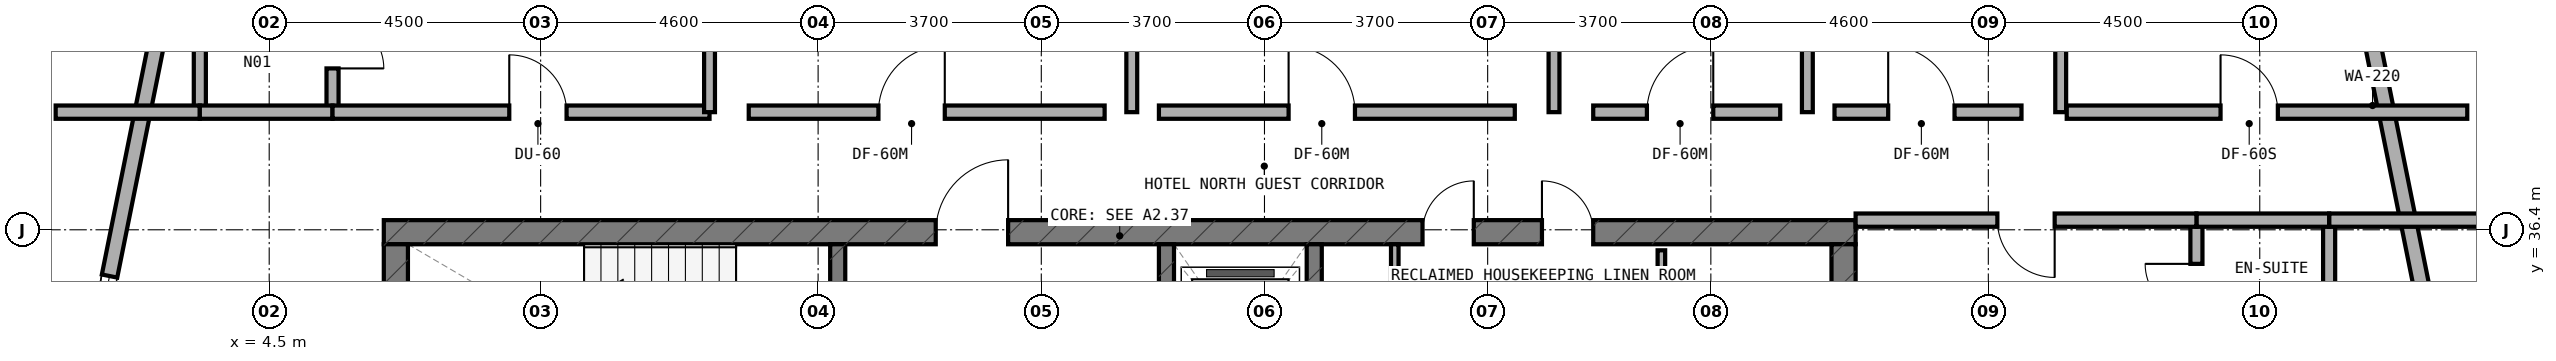
"""IFC4 building model, lengths in metres.
Left out: names, types, materials, properties, quantities, classifications, styles, units other than length and angle.
Written with IfcOpenShell. Run it as: python <this file> out.ifc"""

import sys

from ifc_helpers import new_model, si_unit, direction, frame, frame_2d, origin, place, context, subcontext, project, spatial, rectangle, extrude, element, fill, save


model = new_model("IFC4")
c1 = context("Model", 3, precision=1e-05, world=origin(), true_north=direction((0.0, 1.0)))
c2 = subcontext(c1, "Body", "Model", "MODEL_VIEW")
j1 = project(units=[si_unit("LENGTHUNIT", "METRE"), si_unit("PLANEANGLEUNIT", "RADIAN")], contexts=[c1])
p1 = place(None, origin())
s1 = spatial("IfcSite", under=j1, at=p1, CompositionType="ELEMENT")
p2 = place(p1, origin())
s2 = spatial("IfcBuilding", under=s1, at=p2, CompositionType="ELEMENT")
p3 = place(p2, frame((0.0, 0.0, 166.0)))
s3 = spatial("IfcBuildingStorey", under=s2, at=p3, CompositionType="ELEMENT", Elevation=166.0)
p4 = place(p3, frame((6.4, 36.36, 0.0), z_axis=(0.0, 0.0, 1.0), x_axis=(1.0, 0.0, 0.0)))
e1 = element("IfcWall", 1, at=p4, inside=s3, PredefinedType="SHEAR", context=c2, shape_type="SweptSolid", body=[
    extrude(rectangle(XDim=24.4, YDim=0.4, at=frame_2d((12.2, 0.0))), origin(), (0.0, 0.0, 1.0), 3.5),
])
p5 = place(p4, frame((9.15, 0.0, 0.0)))
e2 = element("IfcOpeningElement", 2, at=p5, cuts=e1, PredefinedType="OPENING", context=c2, shape_type="SweptSolid", body=[
    extrude(rectangle(XDim=1.2, YDim=2.15, at=frame_2d((0.6, 1.075))), frame((0.0, 0.21, 0.0), z_axis=(0.0, -1.0, 0.0), x_axis=(1.0, 0.0, 0.0)), (0.0, 0.0, 1.0), 0.42),
])
p6 = place(p4, frame((19.2, 0.0, 0.0)))
e3 = element("IfcOpeningElement", 3, at=p6, cuts=e1, PredefinedType="OPENING", context=c2, shape_type="SweptSolid", body=[
    extrude(rectangle(XDim=0.85, YDim=2.1, at=frame_2d((0.425, 1.05))), frame((0.0, 0.21, 0.0), z_axis=(0.0, -1.0, 0.0), x_axis=(1.0, 0.0, 0.0)), (0.0, 0.0, 1.0), 0.42),
])
p7 = place(p4, frame((17.22, 0.0, 0.0)))
e4 = element("IfcOpeningElement", 4, at=p7, cuts=e1, PredefinedType="OPENING", context=c2, shape_type="SweptSolid", body=[
    extrude(rectangle(XDim=0.85, YDim=2.1, at=frame_2d((0.425, 1.05))), frame((0.0, 0.21, 0.0), z_axis=(0.0, -1.0, 0.0), x_axis=(1.0, 0.0, 0.0)), (0.0, 0.0, 1.0), 0.42),
])
for number, where, z_axis, x_axis in (
    (5, (6.6, 33.0, 0.0), (0.0, 0.0, 1.0), (0.0, 1.0, 0.0)),
    (6, (30.6, 33.0, 0.0), (0.0, 0.0, 1.0), (0.0, 1.0, 0.0)),
):
    element("IfcWall", number, at=place(p3, frame(where, z_axis=z_axis, x_axis=x_axis)), inside=s3, PredefinedType="SHEAR", context=c2, shape_type="SweptSolid", body=[
        extrude(rectangle(XDim=3.16, YDim=0.4, at=frame_2d((1.58, 0.0))), origin(), (0.0, 0.0, 1.0), 3.5),
    ])
p8 = place(p3, frame((13.925, 33.0, 0.0), z_axis=(0.0, 0.0, 1.0), x_axis=(0.0, 1.0, 0.0)))
e7 = element("IfcWall", 7, at=p8, inside=s3, PredefinedType="STANDARD", context=c2, shape_type="SweptSolid", body=[
    extrude(rectangle(XDim=3.16, YDim=0.25, at=frame_2d((1.58, 0.0))), origin(), (0.0, 0.0, 1.0), 3.22),
])
p9 = place(p8, frame((0.98, 0.0, 0.0)))
e8 = element("IfcOpeningElement", 8, at=p9, cuts=e7, PredefinedType="OPENING", context=c2, shape_type="SweptSolid", body=[
    extrude(rectangle(XDim=1.1, YDim=2.15, at=frame_2d((0.55, 1.075))), frame((0.0, 0.135, 0.0), z_axis=(0.0, -1.0, 0.0), x_axis=(1.0, 0.0, 0.0)), (0.0, 0.0, 1.0), 0.27),
])
p10 = place(p3, frame((19.375, 33.0, 0.0), z_axis=(0.0, 0.0, 1.0), x_axis=(0.0, 1.0, 0.0)))
e9 = element("IfcWall", 9, at=p10, inside=s3, PredefinedType="STANDARD", context=c2, shape_type="SweptSolid", body=[
    extrude(rectangle(XDim=3.16, YDim=0.25, at=frame_2d((1.58, 0.0))), origin(), (0.0, 0.0, 1.0), 3.22),
])
p11 = place(p10, frame((0.98, 0.0, 0.0)))
e10 = element("IfcOpeningElement", 10, at=p11, cuts=e9, PredefinedType="OPENING", context=c2, shape_type="SweptSolid", body=[
    extrude(rectangle(XDim=1.1, YDim=2.15, at=frame_2d((0.55, 1.075))), frame((0.0, 0.135, 0.0), z_axis=(0.0, -1.0, 0.0), x_axis=(1.0, 0.0, 0.0)), (0.0, 0.0, 1.0), 0.27),
])
p12 = place(p3, frame((21.825, 33.0, 0.0), z_axis=(0.0, 0.0, 1.0), x_axis=(0.0, 1.0, 0.0)))
e11 = element("IfcWall", 11, at=p12, inside=s3, PredefinedType="STANDARD", context=c2, shape_type="SweptSolid", body=[
    extrude(rectangle(XDim=3.16, YDim=0.25, at=frame_2d((1.58, 0.0))), origin(), (0.0, 0.0, 1.0), 3.22),
])
p13 = place(p3, frame((41.084, 30.98, 0.0), z_axis=(0.0, 0.0, 1.0), x_axis=(-0.197435082048, 0.980315963543, 0.0)))
e12 = element("IfcWall", 12, at=p13, inside=s3, PredefinedType="STANDARD", context=c2, shape_type="SweptSolid", body=[
    extrude(rectangle(XDim=9.183, YDim=0.26, at=frame_2d((4.591, 0.0))), origin(), (0.0, 0.0, 1.0), 3.22),
])
p14 = place(p13, frame((1.734, 0.0, 0.85)))
e13 = element("IfcOpeningElement", 13, at=p14, cuts=e12, PredefinedType="OPENING", context=c2, shape_type="SweptSolid", body=[
    extrude(rectangle(XDim=2.1, YDim=1.5, at=frame_2d((1.05, 0.75))), frame((0.0, 0.14, 0.0), z_axis=(0.0, -1.0, 0.0), x_axis=(1.0, 0.0, 0.0)), (0.0, 0.0, 1.0), 0.28),
])
p15 = place(p3, frame((2.729, 39.982, 0.0), z_axis=(0.0, 0.0, 1.0), x_axis=(-0.197435082048, -0.980315963543, 0.0)))
e14 = element("IfcWall", 14, at=p15, inside=s3, PredefinedType="STANDARD", context=c2, shape_type="SweptSolid", body=[
    extrude(rectangle(XDim=9.183, YDim=0.26, at=frame_2d((4.591, 0.0))), origin(), (0.0, 0.0, 1.0), 3.22),
])
p16 = place(p15, frame((4.436, 0.0, 0.85)))
e15 = element("IfcOpeningElement", 15, at=p16, cuts=e14, PredefinedType="OPENING", context=c2, shape_type="SweptSolid", body=[
    extrude(rectangle(XDim=2.1, YDim=1.5, at=frame_2d((1.05, 0.75))), frame((0.0, 0.14, 0.0), z_axis=(0.0, -1.0, 0.0), x_axis=(1.0, 0.0, 0.0)), (0.0, 0.0, 1.0), 0.28),
])
p17 = place(p3, frame((27.58, 33.1, 0.0), z_axis=(0.0, 0.0, 1.0), x_axis=(0.0, 1.0, 0.0)))
e16 = element("IfcWall", 16, at=p17, inside=s3, PredefinedType="PARTITIONING", context=c2, shape_type="SweptSolid", body=[
    extrude(rectangle(XDim=2.96, YDim=0.125, at=frame_2d((1.48, 0.0))), origin(), (0.0, 0.0, 1.0), 2.795),
])
p18 = place(p17, frame((1.055, 0.0, 0.0)))
e17 = element("IfcOpeningElement", 17, at=p18, cuts=e16, PredefinedType="OPENING", context=c2, shape_type="SweptSolid", body=[
    extrude(rectangle(XDim=0.85, YDim=2.1, at=frame_2d((0.425, 1.05))), frame((0.0, 0.073, 0.0), z_axis=(0.0, -1.0, 0.0), x_axis=(1.0, 0.0, 0.0)), (0.0, 0.0, 1.0), 0.145),
])
p19 = place(p3, frame((23.16, 34.82, 0.0), z_axis=(0.0, 0.0, 1.0), x_axis=(0.0, 1.0, 0.0)))
e18 = element("IfcWall", 18, at=p19, inside=s3, PredefinedType="PARTITIONING", context=c2, shape_type="SweptSolid", body=[
    extrude(rectangle(XDim=1.34, YDim=0.125, at=frame_2d((0.67, 0.0))), origin(), (0.0, 0.0, 1.0), 3.22),
])
p20 = place(p3, frame((5.55, 38.45, 0.0), z_axis=(0.0, 0.0, 1.0), x_axis=(0.0, 1.0, 0.0)))
e19 = element("IfcWall", 19, at=p20, inside=s3, PredefinedType="PLUMBINGWALL", context=c2, shape_type="SweptSolid", body=[
    extrude(rectangle(XDim=2.1, YDim=0.2, at=frame_2d((1.05, 0.0))), origin(), (0.0, 0.0, 1.0), 3.22),
])
p21 = place(p20, frame((0.625, 0.0, 0.0)))
e20 = element("IfcOpeningElement", 20, at=p21, cuts=e19, PredefinedType="OPENING", context=c2, shape_type="SweptSolid", body=[
    extrude(rectangle(XDim=0.85, YDim=2.1, at=frame_2d((0.425, 1.05))), frame((0.0, 0.11, 0.0), z_axis=(0.0, -1.0, 0.0), x_axis=(1.0, 0.0, 0.0)), (0.0, 0.0, 1.0), 0.22),
])
p22 = place(p3, frame((3.35, 38.45, 0.0), z_axis=(0.0, 0.0, 1.0), x_axis=(0.0, 1.0, 0.0)))
e21 = element("IfcWall", 21, at=p22, inside=s3, PredefinedType="PLUMBINGWALL", context=c2, shape_type="SweptSolid", body=[
    extrude(rectangle(XDim=2.1, YDim=0.2, at=frame_2d((1.05, 0.0))), origin(), (0.0, 0.0, 1.0), 3.22),
])
p23 = place(p3, frame((0.96, 38.35, 0.0), z_axis=(0.0, 0.0, 1.0), x_axis=(1.0, 0.0, 0.0)))
e22 = element("IfcWall", 22, at=p23, inside=s3, PredefinedType="SOLIDWALL", context=c2, shape_type="SweptSolid", body=[
    extrude(rectangle(XDim=2.39, YDim=0.22, at=frame_2d((1.195, 0.0))), origin(), (0.0, 0.0, 1.0), 3.22),
])
p24 = place(p3, frame((3.35, 38.35, 0.0), z_axis=(0.0, 0.0, 1.0), x_axis=(1.0, 0.0, 0.0)))
e23 = element("IfcWall", 23, at=p24, inside=s3, PredefinedType="SOLIDWALL", context=c2, shape_type="SweptSolid", body=[
    extrude(rectangle(XDim=2.2, YDim=0.22, at=frame_2d((1.1, 0.0))), origin(), (0.0, 0.0, 1.0), 3.22),
])
p25 = place(p3, frame((5.55, 38.35, 0.0), z_axis=(0.0, 0.0, 1.0), x_axis=(1.0, 0.0, 0.0)))
e24 = element("IfcWall", 24, at=p25, inside=s3, PredefinedType="SOLIDWALL", context=c2, shape_type="SweptSolid", body=[
    extrude(rectangle(XDim=6.25, YDim=0.22, at=frame_2d((3.125, 0.0))), origin(), (0.0, 0.0, 1.0), 2.795),
])
p26 = place(p25, frame((2.93, 0.0, 0.0)))
e25 = element("IfcOpeningElement", 25, at=p26, cuts=e24, PredefinedType="OPENING", context=c2, shape_type="SweptSolid", body=[
    extrude(rectangle(XDim=0.95, YDim=2.1, at=frame_2d((0.475, 1.05))), frame((0.0, 0.12, 0.0), z_axis=(0.0, -1.0, 0.0), x_axis=(1.0, 0.0, 0.0)), (0.0, 0.0, 1.0), 0.24),
])
p27 = place(p3, frame((11.8, 38.35, 0.0), z_axis=(0.0, 0.0, 1.0), x_axis=(0.0, 1.0, 0.0)))
e26 = element("IfcWall", 26, at=p27, inside=s3, PredefinedType="SOLIDWALL", context=c2, shape_type="SweptSolid", body=[
    extrude(rectangle(XDim=6.157, YDim=0.18, at=frame_2d((3.079, 0.0))), origin(), (0.0, 0.0, 1.0), 2.835),
])
p28 = place(p3, frame((18.8, 38.35, 0.0), z_axis=(0.0, 0.0, 1.0), x_axis=(0.0, 1.0, 0.0)))
e27 = element("IfcWall", 27, at=p28, inside=s3, PredefinedType="SOLIDWALL", context=c2, shape_type="SweptSolid", body=[
    extrude(rectangle(XDim=6.79, YDim=0.18, at=frame_2d((3.395, 0.0))), origin(), (0.0, 0.0, 1.0), 2.835),
])
p29 = place(p3, frame((12.45, 38.35, 0.0), z_axis=(0.0, 0.0, 1.0), x_axis=(1.0, 0.0, 0.0)))
e28 = element("IfcWall", 28, at=p29, inside=s3, PredefinedType="SOLIDWALL", context=c2, shape_type="SweptSolid", body=[
    extrude(rectangle(XDim=5.9, YDim=0.22, at=frame_2d((2.95, 0.0))), origin(), (0.0, 0.0, 1.0), 2.795),
])
p30 = place(p29, frame((2.15, 0.0, 0.0)))
e29 = element("IfcOpeningElement", 29, at=p30, cuts=e28, PredefinedType="OPENING", context=c2, shape_type="SweptSolid", body=[
    extrude(rectangle(XDim=1.1, YDim=2.1, at=frame_2d((0.55, 1.05))), frame((0.0, 0.12, 0.0), z_axis=(0.0, -1.0, 0.0), x_axis=(1.0, 0.0, 0.0)), (0.0, 0.0, 1.0), 0.24),
])
p31 = place(p3, frame((19.25, 38.35, 0.0), z_axis=(0.0, 0.0, 1.0), x_axis=(1.0, 0.0, 0.0)))
e30 = element("IfcWall", 30, at=p31, inside=s3, PredefinedType="SOLIDWALL", context=c2, shape_type="SweptSolid", body=[
    extrude(rectangle(XDim=5.9, YDim=0.22, at=frame_2d((2.95, 0.0))), origin(), (0.0, 0.0, 1.0), 3.22),
])
p32 = place(p31, frame((2.15, 0.0, 0.0)))
e31 = element("IfcOpeningElement", 31, at=p32, cuts=e30, PredefinedType="OPENING", context=c2, shape_type="SweptSolid", body=[
    extrude(rectangle(XDim=1.1, YDim=2.1, at=frame_2d((0.55, 1.05))), frame((0.0, 0.12, 0.0), z_axis=(0.0, -1.0, 0.0), x_axis=(1.0, 0.0, 0.0)), (0.0, 0.0, 1.0), 0.24),
])
p33 = place(p3, frame((25.8, 38.35, 0.0), z_axis=(0.0, 0.0, 1.0), x_axis=(0.0, 1.0, 0.0)))
e32 = element("IfcWall", 32, at=p33, inside=s3, PredefinedType="SOLIDWALL", context=c2, shape_type="SweptSolid", body=[
    extrude(rectangle(XDim=6.79, YDim=0.18, at=frame_2d((3.395, 0.0))), origin(), (0.0, 0.0, 1.0), 2.795),
])
p34 = place(p3, frame((30.0, 38.35, 0.0), z_axis=(0.0, 0.0, 1.0), x_axis=(0.0, 1.0, 0.0)))
e33 = element("IfcWall", 33, at=p34, inside=s3, PredefinedType="SOLIDWALL", context=c2, shape_type="SweptSolid", body=[
    extrude(rectangle(XDim=6.197, YDim=0.18, at=frame_2d((3.099, 0.0))), origin(), (0.0, 0.0, 1.0), 2.835),
])
p35 = place(p3, frame((26.45, 38.35, 0.0), z_axis=(0.0, 0.0, 1.0), x_axis=(1.0, 0.0, 0.0)))
e34 = element("IfcWall", 34, at=p35, inside=s3, PredefinedType="SOLIDWALL", context=c2, shape_type="SweptSolid", body=[
    extrude(rectangle(XDim=3.1, YDim=0.22, at=frame_2d((1.55, 0.0))), origin(), (0.0, 0.0, 1.0), 2.795),
])
p36 = place(p35, frame((0.89, 0.0, 0.0)))
e35 = element("IfcOpeningElement", 35, at=p36, cuts=e34, PredefinedType="OPENING", context=c2, shape_type="SweptSolid", body=[
    extrude(rectangle(XDim=1.1, YDim=2.1, at=frame_2d((0.55, 1.05))), frame((0.0, 0.12, 0.0), z_axis=(0.0, -1.0, 0.0), x_axis=(1.0, 0.0, 0.0)), (0.0, 0.0, 1.0), 0.24),
])
p37 = place(p3, frame((30.45, 38.35, 0.0), z_axis=(0.0, 0.0, 1.0), x_axis=(1.0, 0.0, 0.0)))
e36 = element("IfcWall", 36, at=p37, inside=s3, PredefinedType="SOLIDWALL", context=c2, shape_type="SweptSolid", body=[
    extrude(rectangle(XDim=3.1, YDim=0.22, at=frame_2d((1.55, 0.0))), origin(), (0.0, 0.0, 1.0), 3.22),
])
p38 = place(p37, frame((0.89, 0.0, 0.0)))
e37 = element("IfcOpeningElement", 37, at=p38, cuts=e36, PredefinedType="OPENING", context=c2, shape_type="SweptSolid", body=[
    extrude(rectangle(XDim=1.1, YDim=2.1, at=frame_2d((0.55, 1.05))), frame((0.0, 0.12, 0.0), z_axis=(0.0, -1.0, 0.0), x_axis=(1.0, 0.0, 0.0)), (0.0, 0.0, 1.0), 0.24),
])
p39 = place(p3, frame((34.2, 38.35, 0.0), z_axis=(0.0, 0.0, 1.0), x_axis=(0.0, 1.0, 0.0)))
e38 = element("IfcWall", 38, at=p39, inside=s3, PredefinedType="SOLIDWALL", context=c2, shape_type="SweptSolid", body=[
    extrude(rectangle(XDim=5.351, YDim=0.18, at=frame_2d((2.675, 0.0))), origin(), (0.0, 0.0, 1.0), 2.795),
])
p40 = place(p3, frame((34.3, 38.35, 0.0), z_axis=(0.0, 0.0, 1.0), x_axis=(1.0, 0.0, 0.0)))
e39 = element("IfcWall", 39, at=p40, inside=s3, PredefinedType="SOLIDWALL", context=c2, shape_type="SweptSolid", body=[
    extrude(rectangle(XDim=6.64, YDim=0.22, at=frame_2d((3.32, 0.0))), origin(), (0.0, 0.0, 1.0), 2.835),
])
p41 = place(p40, frame((2.55, 0.0, 0.0)))
e40 = element("IfcOpeningElement", 40, at=p41, cuts=e39, PredefinedType="OPENING", context=c2, shape_type="SweptSolid", body=[
    extrude(rectangle(XDim=0.95, YDim=2.1, at=frame_2d((0.475, 1.05))), frame((0.0, 0.12, 0.0), z_axis=(0.0, -1.0, 0.0), x_axis=(1.0, 0.0, 0.0)), (0.0, 0.0, 1.0), 0.24),
])
p42 = place(p3, frame((36.45, 34.36, 0.0), z_axis=(0.0, 0.0, 1.0), x_axis=(0.0, 1.0, 0.0)))
e41 = element("IfcWall", 41, at=p42, inside=s3, PredefinedType="PLUMBINGWALL", context=c2, shape_type="SweptSolid", body=[
    extrude(rectangle(XDim=2.1, YDim=0.2, at=frame_2d((1.05, 0.0))), origin(), (0.0, 0.0, 1.0), 3.22),
])
p43 = place(p42, frame((0.625, 0.0, 0.0)))
e42 = element("IfcOpeningElement", 42, at=p43, cuts=e41, PredefinedType="OPENING", context=c2, shape_type="SweptSolid", body=[
    extrude(rectangle(XDim=0.85, YDim=2.1, at=frame_2d((0.425, 1.05))), frame((0.0, 0.11, 0.0), z_axis=(0.0, -1.0, 0.0), x_axis=(1.0, 0.0, 0.0)), (0.0, 0.0, 1.0), 0.22),
])
p44 = place(p3, frame((38.65, 34.36, 0.0), z_axis=(0.0, 0.0, 1.0), x_axis=(0.0, 1.0, 0.0)))
e43 = element("IfcWall", 43, at=p44, inside=s3, PredefinedType="PLUMBINGWALL", context=c2, shape_type="SweptSolid", body=[
    extrude(rectangle(XDim=2.1, YDim=0.2, at=frame_2d((1.05, 0.0))), origin(), (0.0, 0.0, 1.0), 3.22),
])
p45 = place(p3, frame((38.65, 36.56, 0.0), z_axis=(0.0, 0.0, 1.0), x_axis=(1.0, 0.0, 0.0)))
e44 = element("IfcWall", 44, at=p45, inside=s3, PredefinedType="SOLIDWALL", context=c2, shape_type="SweptSolid", body=[
    extrude(rectangle(XDim=2.55, YDim=0.22, at=frame_2d((1.275, 0.0))), origin(), (0.0, 0.0, 1.0), 3.22),
])
p46 = place(p3, frame((36.45, 36.56, 0.0), z_axis=(0.0, 0.0, 1.0), x_axis=(1.0, 0.0, 0.0)))
e45 = element("IfcWall", 45, at=p46, inside=s3, PredefinedType="SOLIDWALL", context=c2, shape_type="SweptSolid", body=[
    extrude(rectangle(XDim=2.2, YDim=0.22, at=frame_2d((1.1, 0.0))), origin(), (0.0, 0.0, 1.0), 3.22),
])
p47 = place(p3, frame((30.8, 36.56, 0.0), z_axis=(0.0, 0.0, 1.0), x_axis=(1.0, 0.0, 0.0)))
e46 = element("IfcWall", 46, at=p47, inside=s3, PredefinedType="SOLIDWALL", context=c2, shape_type="SweptSolid", body=[
    extrude(rectangle(XDim=5.65, YDim=0.22, at=frame_2d((2.825, 0.0))), origin(), (0.0, 0.0, 1.0), 2.795),
])
p48 = place(p47, frame((2.35, 0.0, 0.0)))
e47 = element("IfcOpeningElement", 47, at=p48, cuts=e46, PredefinedType="OPENING", context=c2, shape_type="SweptSolid", body=[
    extrude(rectangle(XDim=0.95, YDim=2.1, at=frame_2d((0.475, 1.05))), frame((0.0, 0.12, 0.0), z_axis=(0.0, -1.0, 0.0), x_axis=(1.0, 0.0, 0.0)), (0.0, 0.0, 1.0), 0.24),
])
p49 = place(p16, origin())
e48 = element("IfcWindow", 48, at=p49, inside=s3, PartitioningType="SINGLE_PANEL", PredefinedType="WINDOW", context=c2, shape_type="SweptSolid", body=[
    extrude(rectangle(XDim=2.1, YDim=1.5, at=frame_2d((1.05, 0.75))), frame((0.0, 0.03, 0.0), z_axis=(0.0, -1.0, 0.0), x_axis=(1.0, 0.0, 0.0)), (0.0, 0.0, 1.0), 0.06),
])
fill(e15, e48)
p50 = place(p5, origin())
e49 = element("IfcDoor", 49, at=p50, inside=s3, OperationType="SINGLE_SWING_RIGHT", PredefinedType="DOOR", context=c2, shape_type="SweptSolid", body=[
    extrude(rectangle(XDim=1.2, YDim=2.15, at=frame_2d((0.6, 1.075))), frame((0.0, 0.025, 0.0), z_axis=(0.0, -1.0, 0.0), x_axis=(1.0, 0.0, 0.0)), (0.0, 0.0, 1.0), 0.05),
])
fill(e2, e49)
p51 = place(p6, origin())
e50 = element("IfcDoor", 50, at=p51, inside=s3, OperationType="SINGLE_SWING_LEFT", PredefinedType="DOOR", context=c2, shape_type="SweptSolid", body=[
    extrude(rectangle(XDim=0.85, YDim=2.1, at=frame_2d((0.425, 1.05))), frame((0.0, 0.025, 0.0), z_axis=(0.0, -1.0, 0.0), x_axis=(1.0, 0.0, 0.0)), (0.0, 0.0, 1.0), 0.05),
])
fill(e3, e50)
p52 = place(p7, origin())
e51 = element("IfcDoor", 51, at=p52, inside=s3, OperationType="SINGLE_SWING_RIGHT", PredefinedType="DOOR", context=c2, shape_type="SweptSolid", body=[
    extrude(rectangle(XDim=0.85, YDim=2.1, at=frame_2d((0.425, 1.05))), frame((0.0, 0.025, 0.0), z_axis=(0.0, -1.0, 0.0), x_axis=(1.0, 0.0, 0.0)), (0.0, 0.0, 1.0), 0.05),
])
fill(e4, e51)
p53 = place(p21, frame((0.85, 0.0, 0.0), z_axis=(0.0, 0.0, 1.0), x_axis=(-1.0, 0.0, 0.0)))
e52 = element("IfcDoor", 52, at=p53, inside=s3, OperationType="SINGLE_SWING_RIGHT", PredefinedType="DOOR", context=c2, shape_type="SweptSolid", body=[
    extrude(rectangle(XDim=0.85, YDim=2.1, at=frame_2d((0.425, 1.05))), frame((0.0, 0.025, 0.0), z_axis=(0.0, -1.0, 0.0), x_axis=(1.0, 0.0, 0.0)), (0.0, 0.0, 1.0), 0.05),
])
fill(e20, e52)
p54 = place(p26, origin())
e53 = element("IfcDoor", 53, at=p54, inside=s3, OperationType="SINGLE_SWING_LEFT", PredefinedType="DOOR", context=c2, shape_type="SweptSolid", body=[
    extrude(rectangle(XDim=0.95, YDim=2.1, at=frame_2d((0.475, 1.05))), frame((0.0, 0.025, 0.0), z_axis=(0.0, -1.0, 0.0), x_axis=(1.0, 0.0, 0.0)), (0.0, 0.0, 1.0), 0.05),
])
fill(e25, e53)
p55 = place(p30, origin())
e54 = element("IfcDoor", 54, at=p55, inside=s3, OperationType="SINGLE_SWING_RIGHT", PredefinedType="DOOR", context=c2, shape_type="SweptSolid", body=[
    extrude(rectangle(XDim=1.1, YDim=2.1, at=frame_2d((0.55, 1.05))), frame((0.0, 0.025, 0.0), z_axis=(0.0, -1.0, 0.0), x_axis=(1.0, 0.0, 0.0)), (0.0, 0.0, 1.0), 0.05),
])
fill(e29, e54)
p56 = place(p32, origin())
e55 = element("IfcDoor", 55, at=p56, inside=s3, OperationType="SINGLE_SWING_LEFT", PredefinedType="DOOR", context=c2, shape_type="SweptSolid", body=[
    extrude(rectangle(XDim=1.1, YDim=2.1, at=frame_2d((0.55, 1.05))), frame((0.0, 0.025, 0.0), z_axis=(0.0, -1.0, 0.0), x_axis=(1.0, 0.0, 0.0)), (0.0, 0.0, 1.0), 0.05),
])
fill(e31, e55)
p57 = place(p36, origin())
e56 = element("IfcDoor", 56, at=p57, inside=s3, OperationType="SINGLE_SWING_RIGHT", PredefinedType="DOOR", context=c2, shape_type="SweptSolid", body=[
    extrude(rectangle(XDim=1.1, YDim=2.1, at=frame_2d((0.55, 1.05))), frame((0.0, 0.025, 0.0), z_axis=(0.0, -1.0, 0.0), x_axis=(1.0, 0.0, 0.0)), (0.0, 0.0, 1.0), 0.05),
])
fill(e35, e56)
p58 = place(p38, origin())
e57 = element("IfcDoor", 57, at=p58, inside=s3, OperationType="SINGLE_SWING_LEFT", PredefinedType="DOOR", context=c2, shape_type="SweptSolid", body=[
    extrude(rectangle(XDim=1.1, YDim=2.1, at=frame_2d((0.55, 1.05))), frame((0.0, 0.025, 0.0), z_axis=(0.0, -1.0, 0.0), x_axis=(1.0, 0.0, 0.0)), (0.0, 0.0, 1.0), 0.05),
])
fill(e37, e57)
p59 = place(p41, origin())
e58 = element("IfcDoor", 58, at=p59, inside=s3, OperationType="SINGLE_SWING_LEFT", PredefinedType="DOOR", context=c2, shape_type="SweptSolid", body=[
    extrude(rectangle(XDim=0.95, YDim=2.1, at=frame_2d((0.475, 1.05))), frame((0.0, 0.025, 0.0), z_axis=(0.0, -1.0, 0.0), x_axis=(1.0, 0.0, 0.0)), (0.0, 0.0, 1.0), 0.05),
])
fill(e40, e58)
p60 = place(p43, origin())
e59 = element("IfcDoor", 59, at=p60, inside=s3, OperationType="SINGLE_SWING_RIGHT", PredefinedType="DOOR", context=c2, shape_type="SweptSolid", body=[
    extrude(rectangle(XDim=0.85, YDim=2.1, at=frame_2d((0.425, 1.05))), frame((0.0, 0.025, 0.0), z_axis=(0.0, -1.0, 0.0), x_axis=(1.0, 0.0, 0.0)), (0.0, 0.0, 1.0), 0.05),
])
fill(e42, e59)
p61 = place(p48, frame((0.95, 0.0, 0.0), z_axis=(0.0, 0.0, 1.0), x_axis=(-1.0, 0.0, 0.0)))
e60 = element("IfcDoor", 60, at=p61, inside=s3, OperationType="SINGLE_SWING_LEFT", PredefinedType="DOOR", context=c2, shape_type="SweptSolid", body=[
    extrude(rectangle(XDim=0.95, YDim=2.1, at=frame_2d((0.475, 1.05))), frame((0.0, 0.025, 0.0), z_axis=(0.0, -1.0, 0.0), x_axis=(1.0, 0.0, 0.0)), (0.0, 0.0, 1.0), 0.05),
])
fill(e47, e60)
save(model, sys.argv[1])
